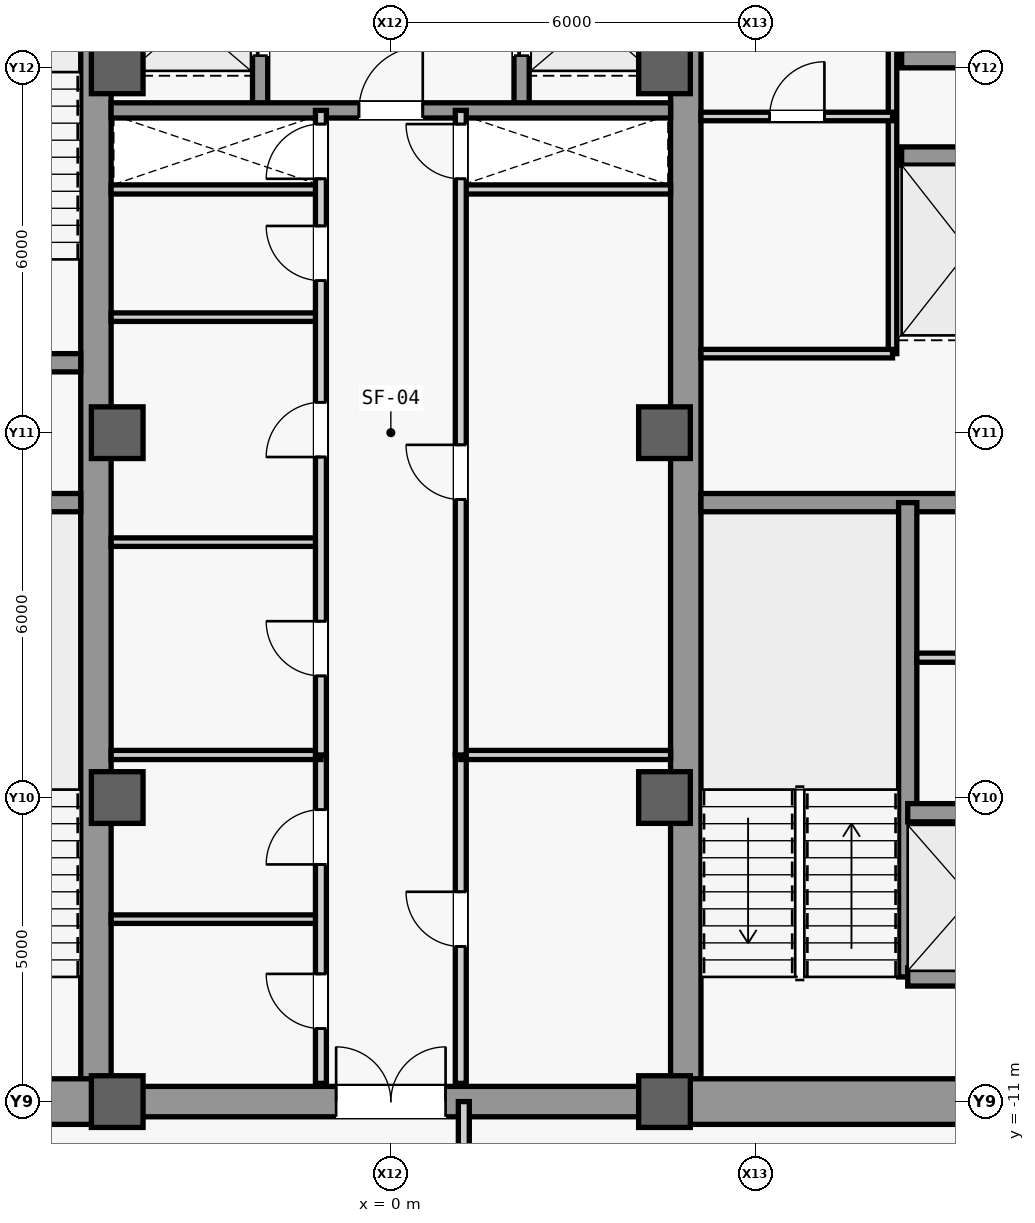
"""IFC4 building model, lengths in metres.
Left out: names, types, materials, properties, quantities, classifications, styles, units other than length and angle.
Written with IfcOpenShell. Run it as: python <this file> out.ifc"""

import sys

from ifc_helpers import new_model, si_unit, direction, frame, frame_2d, origin, origin_2d, place, context, subcontext, project, spatial, rectangle, extrude, source, transform, mapped, element, fill, save


model = new_model("IFC4")
c1 = context("Model", 3, precision=1e-05, world=origin(), true_north=direction((0.0, 1.0)))
c2 = subcontext(c1, "Body", "Model", "MODEL_VIEW")
j1 = project(units=[si_unit("LENGTHUNIT", "METRE"), si_unit("PLANEANGLEUNIT", "RADIAN")], contexts=[c1])
p1 = place(None, origin())
s1 = spatial("IfcSite", under=j1, at=p1, CompositionType="ELEMENT")
p2 = place(p1, origin())
s2 = spatial("IfcBuilding", under=s1, at=p2, CompositionType="ELEMENT")
p3 = place(p2, frame((0.0, 0.0, 171.1)))
s3 = spatial("IfcBuildingStorey", under=s2, at=p3, CompositionType="ELEMENT", Elevation=171.1)
m1 = source(origin(), c2, "Body", "SweptSolid", [
    extrude(rectangle(XDim=21.4, YDim=0.5, at=frame_2d((10.7, 0.0))), origin(), (0.0, 0.0, 1.0), 3.78),
])
for number, where, z_axis, x_axis in (
    (1, (-4.85, -10.7, 0.0), (0.0, 0.0, 1.0), (0.0, 1.0, 0.0)),
    (2, (4.85, -10.7, 0.0), (0.0, 0.0, 1.0), (0.0, 1.0, 0.0)),
):
    element("IfcWall", number, at=place(p3, frame(where, z_axis=z_axis, x_axis=x_axis)), inside=s3, PredefinedType="SHEAR", context=c2, shape_type="MappedRepresentation", body=[
        mapped(m1, transform((0.0, 0.0, 0.0), scale=1.0)),
    ])
m2 = source(origin(), c2, "Body", "SweptSolid", [
    extrude(rectangle(XDim=5.85, YDim=0.75, at=frame_2d((2.925, 0.0))), origin(), (0.0, 0.0, 1.0), 3.78),
])
for number, where, z_axis, x_axis in (
    (3, (-10.7, -11.0, 0.0), (0.0, 0.0, 1.0), (1.0, 0.0, 0.0)),
    (4, (4.85, -11.0, 0.0), (0.0, 0.0, 1.0), (1.0, 0.0, 0.0)),
):
    element("IfcWall", number, at=place(p3, frame(where, z_axis=z_axis, x_axis=x_axis)), inside=s3, PredefinedType="SHEAR", context=c2, shape_type="MappedRepresentation", body=[
        mapped(m2, transform((0.0, 0.0, 0.0), scale=1.0)),
    ])
m3 = source(origin(), c2, "Body", "SweptSolid", [
    extrude(rectangle(XDim=5.6, YDim=0.3, at=frame_2d((2.8, 0.0))), origin(), (0.0, 0.0, 1.0), 3.78),
])
for number, where, z_axis, x_axis in (
    (5, (-10.7, -1.15, 0.0), (0.0, 0.0, 1.0), (1.0, 0.0, 0.0)),
    (6, (-10.7, 1.15, 0.0), (0.0, 0.0, 1.0), (1.0, 0.0, 0.0)),
    (7, (5.1, -1.15, 0.0), (0.0, 0.0, 1.0), (1.0, 0.0, 0.0)),
):
    element("IfcWall", number, at=place(p3, frame(where, z_axis=z_axis, x_axis=x_axis)), inside=s3, PredefinedType="SHEAR", context=c2, shape_type="MappedRepresentation", body=[
        mapped(m3, transform((0.0, 0.0, 0.0), scale=1.0)),
    ])
m4 = source(origin(), c2, "Body", "SweptSolid", [
    extrude(rectangle(XDim=9.2, YDim=0.5, at=frame_2d((4.6, 0.0))), origin(), (0.0, 0.0, 1.0), 3.78),
])
p4 = place(p3, frame((-4.6, -11.0, 0.0), z_axis=(0.0, 0.0, 1.0), x_axis=(1.0, 0.0, 0.0)))
e8 = element("IfcWall", 8, at=p4, inside=s3, PredefinedType="SHEAR", context=c2, shape_type="MappedRepresentation", body=[
    mapped(m4, transform((0.0, 0.0, 0.0), scale=1.0)),
])
m5 = source(origin(), c2, "Body", "SweptSolid", [
    extrude(rectangle(XDim=1.8, YDim=2.25, at=frame_2d((0.9, 1.125))), frame((0.0, 0.26, 0.0), z_axis=(0.0, -1.0, 0.0), x_axis=(1.0, 0.0, 0.0)), (0.0, 0.0, 1.0), 0.52),
])
p5 = place(p4, frame((3.7, 0.0, 0.0)))
e9 = element("IfcOpeningElement", 9, at=p5, cuts=e8, PredefinedType="OPENING", context=c2, shape_type="MappedRepresentation", body=[
    mapped(m5, transform((0.0, 0.0, 0.0), scale=1.0)),
])
m6 = source(origin(), c2, "Body", "SweptSolid", [
    extrude(rectangle(XDim=0.85, YDim=0.85, at=origin_2d()), origin(), (0.0, 0.0, 1.0), 4.0),
])
for number, where, z_axis, x_axis in (
    (10, (-4.5, -11.0, 0.0), (0.0, 0.0, 1.0), (1.0, 0.0, 0.0)),
    (11, (-4.5, -6.0, 0.0), (0.0, 0.0, 1.0), (1.0, 0.0, 0.0)),
    (12, (-4.5, 0.0, 0.0), (0.0, 0.0, 1.0), (1.0, 0.0, 0.0)),
    (13, (-4.5, 6.0, 0.0), (0.0, 0.0, 1.0), (1.0, 0.0, 0.0)),
    (14, (4.5, -11.0, 0.0), (0.0, 0.0, 1.0), (1.0, 0.0, 0.0)),
    (15, (4.5, -6.0, 0.0), (0.0, 0.0, 1.0), (1.0, 0.0, 0.0)),
    (16, (4.5, 0.0, 0.0), (0.0, 0.0, 1.0), (1.0, 0.0, 0.0)),
    (17, (4.5, 6.0, 0.0), (0.0, 0.0, 1.0), (1.0, 0.0, 0.0)),
):
    element("IfcColumn", number, at=place(p3, frame(where, z_axis=z_axis, x_axis=x_axis)), inside=s3, PredefinedType="COLUMN", context=c2, shape_type="MappedRepresentation", body=[
        mapped(m6, transform((0.0, 0.0, 0.0), scale=1.0)),
    ])
m7 = source(origin(), c2, "Body", "SweptSolid", [
    extrude(rectangle(XDim=7.8, YDim=0.3, at=frame_2d((3.9, 0.0))), origin(), (0.0, 0.0, 1.0), 3.78),
])
p6 = place(p3, frame((8.5, -8.95, 0.0), z_axis=(0.0, 0.0, 1.0), x_axis=(0.0, 1.0, 0.0)))
e18 = element("IfcWall", 18, at=p6, inside=s3, PredefinedType="SHEAR", context=c2, shape_type="MappedRepresentation", body=[
    mapped(m7, transform((0.0, 0.0, 0.0), scale=1.0)),
])
m8 = source(origin(), c2, "Body", "SweptSolid", [
    extrude(rectangle(XDim=2.2, YDim=0.3, at=frame_2d((1.1, 0.0))), origin(), (0.0, 0.0, 1.0), 3.78),
])
for number, where, z_axis, x_axis in (
    (19, (8.5, -8.95, 0.0), (0.0, 0.0, 1.0), (1.0, 0.0, 0.0)),
    (20, (8.5, -6.25, 0.0), (0.0, 0.0, 1.0), (1.0, 0.0, 0.0)),
):
    element("IfcWall", number, at=place(p3, frame(where, z_axis=z_axis, x_axis=x_axis)), inside=s3, PredefinedType="SHEAR", context=c2, shape_type="MappedRepresentation", body=[
        mapped(m8, transform((0.0, 0.0, 0.0), scale=1.0)),
    ])
m9 = source(origin(), c2, "Body", "SweptSolid", [
    extrude(rectangle(XDim=2.3, YDim=0.3, at=frame_2d((1.15, 0.0))), origin(), (0.0, 0.0, 1.0), 3.78),
])
for number, where, z_axis, x_axis in (
    (21, (8.4, 4.55, 0.0), (0.0, 0.0, 1.0), (1.0, 0.0, 0.0)),
    (22, (8.4, 6.15, 0.0), (0.0, 0.0, 1.0), (1.0, 0.0, 0.0)),
):
    element("IfcWall", number, at=place(p3, frame(where, z_axis=z_axis, x_axis=x_axis)), inside=s3, PredefinedType="SHEAR", context=c2, shape_type="MappedRepresentation", body=[
        mapped(m9, transform((0.0, 0.0, 0.0), scale=1.0)),
    ])
m10 = source(origin(), c2, "Body", "SweptSolid", [
    extrude(rectangle(XDim=2.05, YDim=0.15, at=frame_2d((1.025, 0.0))), origin(), (0.0, 0.0, 1.0), 3.78),
])
p7 = place(p3, frame((8.65, -3.7, 0.0), z_axis=(0.0, 0.0, 1.0), x_axis=(1.0, 0.0, 0.0)))
e23 = element("IfcWall", 23, at=p7, inside=s3, PredefinedType="PARTITIONING", context=c2, shape_type="MappedRepresentation", body=[
    mapped(m10, transform((0.0, 0.0, 0.0), scale=1.0)),
])
m11 = source(origin(), c2, "Body", "SweptSolid", [
    extrude(rectangle(XDim=9.4, YDim=0.14, at=frame_2d((4.7, 0.0))), origin(), (0.0, 0.0, 1.0), 3.78),
])
p8 = place(p3, frame((8.25, 1.3, 0.0), z_axis=(0.0, 0.0, 1.0), x_axis=(0.0, 1.0, 0.0)))
e24 = element("IfcWall", 24, at=p8, inside=s3, PredefinedType="PARTITIONING", context=c2, shape_type="MappedRepresentation", body=[
    mapped(m11, transform((0.0, 0.0, 0.0), scale=1.0)),
])
m12 = source(origin(), c2, "Body", "SweptSolid", [
    extrude(rectangle(XDim=3.15, YDim=0.14, at=frame_2d((1.575, 0.0))), origin(), (0.0, 0.0, 1.0), 3.78),
])
p9 = place(p3, frame((5.1, 1.3, 0.0), z_axis=(0.0, 0.0, 1.0), x_axis=(1.0, 0.0, 0.0)))
e25 = element("IfcWall", 25, at=p9, inside=s3, PredefinedType="PARTITIONING", context=c2, shape_type="MappedRepresentation", body=[
    mapped(m12, transform((0.0, 0.0, 0.0), scale=1.0)),
])
p10 = place(p3, frame((5.1, 5.2, 0.0), z_axis=(0.0, 0.0, 1.0), x_axis=(1.0, 0.0, 0.0)))
e26 = element("IfcWall", 26, at=p10, inside=s3, PredefinedType="PARTITIONING", context=c2, shape_type="MappedRepresentation", body=[
    mapped(m12, transform((0.0, 0.0, 0.0), scale=1.0)),
])
m13 = source(origin(), c2, "Body", "SweptSolid", [
    extrude(rectangle(XDim=0.9, YDim=2.15, at=frame_2d((0.45, 1.075))), frame((0.0, 0.08, 0.0), z_axis=(0.0, -1.0, 0.0), x_axis=(1.0, 0.0, 0.0)), (0.0, 0.0, 1.0), 0.16),
])
p11 = place(p10, frame((1.13, 0.0, 0.0)))
e27 = element("IfcOpeningElement", 27, at=p11, cuts=e26, PredefinedType="OPENING", context=c2, shape_type="MappedRepresentation", body=[
    mapped(m13, transform((0.0, 0.0, 0.0), scale=1.0)),
])
m14 = source(origin(), c2, "Body", "SweptSolid", [
    extrude(rectangle(XDim=3.45, YDim=0.15, at=frame_2d((1.725, 0.0))), origin(), (0.0, 0.0, 1.0), 3.78),
])
for number, where, z_axis, x_axis in (
    (28, (-4.6, 4.0, 0.0), (0.0, 0.0, 1.0), (1.0, 0.0, 0.0)),
    (29, (1.15, 4.0, 0.0), (0.0, 0.0, 1.0), (1.0, 0.0, 0.0)),
):
    element("IfcWall", number, at=place(p3, frame(where, z_axis=z_axis, x_axis=x_axis)), inside=s3, PredefinedType="PARTITIONING", context=c2, shape_type="MappedRepresentation", body=[
        mapped(m14, transform((0.0, 0.0, 0.0), scale=1.0)),
    ])
m15 = source(origin(), c2, "Body", "SweptSolid", [
    extrude(rectangle(XDim=3.45, YDim=0.14, at=frame_2d((1.725, 0.0))), origin(), (0.0, 0.0, 1.0), 3.78),
])
p12 = place(p3, frame((-4.6, -8.0, 0.0), z_axis=(0.0, 0.0, 1.0), x_axis=(1.0, 0.0, 0.0)))
e30 = element("IfcWall", 30, at=p12, inside=s3, PredefinedType="PARTITIONING", context=c2, shape_type="MappedRepresentation", body=[
    mapped(m15, transform((0.0, 0.0, 0.0), scale=1.0)),
])
m16 = source(origin(), c2, "Body", "SweptSolid", [
    extrude(rectangle(XDim=5.4, YDim=0.18, at=frame_2d((2.7, 0.0))), origin(), (0.0, 0.0, 1.0), 3.78),
])
p13 = place(p3, frame((-1.15, -10.7, 0.0), z_axis=(0.0, 0.0, 1.0), x_axis=(0.0, 1.0, 0.0)))
e31 = element("IfcWall", 31, at=p13, inside=s3, PredefinedType="PARTITIONING", context=c2, shape_type="MappedRepresentation", body=[
    mapped(m16, transform((0.0, 0.0, 0.0), scale=1.0)),
])
m17 = source(origin(), c2, "Body", "SweptSolid", [
    extrude(rectangle(XDim=0.9, YDim=2.15, at=frame_2d((0.45, 1.075))), frame((0.0, 0.1, 0.0), z_axis=(0.0, -1.0, 0.0), x_axis=(1.0, 0.0, 0.0)), (0.0, 0.0, 1.0), 0.2),
])
p14 = place(p13, frame((0.9, 0.0, 0.0)))
e32 = element("IfcOpeningElement", 32, at=p14, cuts=e31, PredefinedType="OPENING", context=c2, shape_type="MappedRepresentation", body=[
    mapped(m17, transform((0.0, 0.0, 0.0), scale=1.0)),
])
p15 = place(p13, frame((3.6, 0.0, 0.0)))
e33 = element("IfcOpeningElement", 33, at=p15, cuts=e31, PredefinedType="OPENING", context=c2, shape_type="MappedRepresentation", body=[
    mapped(m17, transform((0.0, 0.0, 0.0), scale=1.0)),
])
p16 = place(p3, frame((1.15, -10.7, 0.0), z_axis=(0.0, 0.0, 1.0), x_axis=(0.0, 1.0, 0.0)))
e34 = element("IfcWall", 34, at=p16, inside=s3, PredefinedType="PARTITIONING", context=c2, shape_type="MappedRepresentation", body=[
    mapped(m16, transform((0.0, 0.0, 0.0), scale=1.0)),
])
p17 = place(p16, frame((2.25, 0.0, 0.0)))
e35 = element("IfcOpeningElement", 35, at=p17, cuts=e34, PredefinedType="OPENING", context=c2, shape_type="MappedRepresentation", body=[
    mapped(m17, transform((0.0, 0.0, 0.0), scale=1.0)),
])
for number, where, z_axis, x_axis in (
    (36, (-4.6, -5.3, 0.0), (0.0, 0.0, 1.0), (1.0, 0.0, 0.0)),
    (37, (1.15, -5.3, 0.0), (0.0, 0.0, 1.0), (1.0, 0.0, 0.0)),
):
    element("IfcWall", number, at=place(p3, frame(where, z_axis=z_axis, x_axis=x_axis)), inside=s3, PredefinedType="PARTITIONING", context=c2, shape_type="MappedRepresentation", body=[
        mapped(m14, transform((0.0, 0.0, 0.0), scale=1.0)),
    ])
m18 = source(origin(), c2, "Body", "SweptSolid", [
    extrude(rectangle(XDim=5.4, YDim=0.25, at=frame_2d((2.7, 0.0))), origin(), (0.0, 0.0, 1.0), 3.78),
])
p18 = place(p3, frame((-2.15, 5.3, 0.0), z_axis=(0.0, 0.0, 1.0), x_axis=(0.0, 1.0, 0.0)))
e38 = element("IfcWall", 38, at=p18, inside=s3, PredefinedType="SHEAR", context=c2, shape_type="MappedRepresentation", body=[
    mapped(m18, transform((0.0, 0.0, 0.0), scale=1.0)),
])
m19 = source(origin(), c2, "Body", "SweptSolid", [
    extrude(rectangle(XDim=1.2, YDim=2.3, at=frame_2d((0.6, 1.15))), frame((0.0, 0.135, 0.0), z_axis=(0.0, -1.0, 0.0), x_axis=(1.0, 0.0, 0.0)), (0.0, 0.0, 1.0), 0.27),
])
p19 = place(p18, frame((3.3, 0.0, 0.0)))
e39 = element("IfcOpeningElement", 39, at=p19, cuts=e38, PredefinedType="OPENING", context=c2, shape_type="MappedRepresentation", body=[
    mapped(m19, transform((0.0, 0.0, 0.0), scale=1.0)),
])
p20 = place(p18, frame((0.9, 0.0, 0.0)))
e40 = element("IfcOpeningElement", 40, at=p20, cuts=e38, PredefinedType="OPENING", context=c2, shape_type="MappedRepresentation", body=[
    mapped(m19, transform((0.0, 0.0, 0.0), scale=1.0)),
])
p21 = place(p3, frame((2.15, 5.3, 0.0), z_axis=(0.0, 0.0, 1.0), x_axis=(0.0, 1.0, 0.0)))
e41 = element("IfcWall", 41, at=p21, inside=s3, PredefinedType="SHEAR", context=c2, shape_type="MappedRepresentation", body=[
    mapped(m18, transform((0.0, 0.0, 0.0), scale=1.0)),
])
p22 = place(p21, frame((3.3, 0.0, 0.0)))
e42 = element("IfcOpeningElement", 42, at=p22, cuts=e41, PredefinedType="OPENING", context=c2, shape_type="MappedRepresentation", body=[
    mapped(m19, transform((0.0, 0.0, 0.0), scale=1.0)),
])
p23 = place(p21, frame((0.9, 0.0, 0.0)))
e43 = element("IfcOpeningElement", 43, at=p23, cuts=e41, PredefinedType="OPENING", context=c2, shape_type="MappedRepresentation", body=[
    mapped(m19, transform((0.0, 0.0, 0.0), scale=1.0)),
])
m20 = source(origin(), c2, "Body", "SweptSolid", [
    extrude(rectangle(XDim=9.2, YDim=0.25, at=frame_2d((4.6, 0.0))), origin(), (0.0, 0.0, 1.0), 3.78),
])
p24 = place(p3, frame((-4.6, 5.3, 0.0), z_axis=(0.0, 0.0, 1.0), x_axis=(1.0, 0.0, 0.0)))
e44 = element("IfcWall", 44, at=p24, inside=s3, PredefinedType="SHEAR", context=c2, shape_type="MappedRepresentation", body=[
    mapped(m20, transform((0.0, 0.0, 0.0), scale=1.0)),
])
m21 = source(origin(), c2, "Body", "SweptSolid", [
    extrude(rectangle(XDim=1.05, YDim=2.2, at=frame_2d((0.525, 1.1))), frame((0.0, 0.135, 0.0), z_axis=(0.0, -1.0, 0.0), x_axis=(1.0, 0.0, 0.0)), (0.0, 0.0, 1.0), 0.27),
])
p25 = place(p24, frame((4.075, 0.0, 0.0)))
e45 = element("IfcOpeningElement", 45, at=p25, cuts=e44, PredefinedType="OPENING", context=c2, shape_type="MappedRepresentation", body=[
    mapped(m21, transform((0.0, 0.0, 0.0), scale=1.0)),
])
for number, where, z_axis, x_axis in (
    (46, (-4.6, -1.8, 0.0), (0.0, 0.0, 1.0), (1.0, 0.0, 0.0)),
    (47, (-4.6, 1.9, 0.0), (0.0, 0.0, 1.0), (1.0, 0.0, 0.0)),
):
    element("IfcWall", number, at=place(p3, frame(where, z_axis=z_axis, x_axis=x_axis)), inside=s3, PredefinedType="PARTITIONING", context=c2, shape_type="MappedRepresentation", body=[
        mapped(m15, transform((0.0, 0.0, 0.0), scale=1.0)),
    ])
m22 = source(origin(), c2, "Body", "SweptSolid", [
    extrude(rectangle(XDim=10.6, YDim=0.18, at=frame_2d((5.3, 0.0))), origin(), (0.0, 0.0, 1.0), 3.78),
])
p26 = place(p3, frame((-1.15, -5.3, 0.0), z_axis=(0.0, 0.0, 1.0), x_axis=(0.0, 1.0, 0.0)))
e48 = element("IfcWall", 48, at=p26, inside=s3, PredefinedType="PARTITIONING", context=c2, shape_type="MappedRepresentation", body=[
    mapped(m22, transform((0.0, 0.0, 0.0), scale=1.0)),
])
p27 = place(p26, frame((1.3, 0.0, 0.0)))
e49 = element("IfcOpeningElement", 49, at=p27, cuts=e48, PredefinedType="OPENING", context=c2, shape_type="MappedRepresentation", body=[
    mapped(m17, transform((0.0, 0.0, 0.0), scale=1.0)),
])
p28 = place(p26, frame((4.9, 0.0, 0.0)))
e50 = element("IfcOpeningElement", 50, at=p28, cuts=e48, PredefinedType="OPENING", context=c2, shape_type="MappedRepresentation", body=[
    mapped(m17, transform((0.0, 0.0, 0.0), scale=1.0)),
])
p29 = place(p26, frame((7.8, 0.0, 0.0)))
e51 = element("IfcOpeningElement", 51, at=p29, cuts=e48, PredefinedType="OPENING", context=c2, shape_type="MappedRepresentation", body=[
    mapped(m17, transform((0.0, 0.0, 0.0), scale=1.0)),
])
p30 = place(p26, frame((9.475, 0.0, 0.0)))
e52 = element("IfcOpeningElement", 52, at=p30, cuts=e48, PredefinedType="OPENING", context=c2, shape_type="MappedRepresentation", body=[
    mapped(m17, transform((0.0, 0.0, 0.0), scale=1.0)),
])
p31 = place(p3, frame((1.15, -5.3, 0.0), z_axis=(0.0, 0.0, 1.0), x_axis=(0.0, 1.0, 0.0)))
e53 = element("IfcWall", 53, at=p31, inside=s3, PredefinedType="PARTITIONING", context=c2, shape_type="MappedRepresentation", body=[
    mapped(m22, transform((0.0, 0.0, 0.0), scale=1.0)),
])
p32 = place(p31, frame((4.2, 0.0, 0.0)))
e54 = element("IfcOpeningElement", 54, at=p32, cuts=e53, PredefinedType="OPENING", context=c2, shape_type="MappedRepresentation", body=[
    mapped(m17, transform((0.0, 0.0, 0.0), scale=1.0)),
])
p33 = place(p31, frame((9.475, 0.0, 0.0)))
e55 = element("IfcOpeningElement", 55, at=p33, cuts=e53, PredefinedType="OPENING", context=c2, shape_type="MappedRepresentation", body=[
    mapped(m17, transform((0.0, 0.0, 0.0), scale=1.0)),
])
m23 = source(origin(), c2, "Body", "SweptSolid", [
    extrude(rectangle(XDim=3.2, YDim=0.18, at=frame_2d((1.6, 0.0))), origin(), (0.0, 0.0, 1.0), 3.78),
])
p34 = place(p3, frame((1.2, -14.2, 0.0), z_axis=(0.0, 0.0, 1.0), x_axis=(0.0, 1.0, 0.0)))
e56 = element("IfcWall", 56, at=p34, inside=s3, PredefinedType="PARTITIONING", context=c2, shape_type="MappedRepresentation", body=[
    mapped(m23, transform((0.0, 0.0, 0.0), scale=1.0)),
])
m24 = source(origin(), c2, "Body", "SweptSolid", [
    extrude(rectangle(XDim=0.9, YDim=2.15, at=frame_2d((0.45, 1.075))), frame((0.0, 0.025, 0.0), z_axis=(0.0, -1.0, 0.0), x_axis=(1.0, 0.0, 0.0)), (0.0, 0.0, 1.0), 0.05),
])
p35 = place(p11, origin())
e57 = element("IfcDoor", 57, at=p35, inside=s3, OperationType="SINGLE_SWING_RIGHT", PredefinedType="DOOR", context=c2, shape_type="MappedRepresentation", body=[
    mapped(m24, transform((0.0, 0.0, 0.0), scale=1.0)),
])
fill(e27, e57)
p36 = place(p14, origin())
e58 = element("IfcDoor", 58, at=p36, inside=s3, OperationType="SINGLE_SWING_RIGHT", PredefinedType="DOOR", context=c2, shape_type="MappedRepresentation", body=[
    mapped(m24, transform((0.0, 0.0, 0.0), scale=1.0)),
])
fill(e32, e58)
p37 = place(p15, origin())
e59 = element("IfcDoor", 59, at=p37, inside=s3, OperationType="SINGLE_SWING_LEFT", PredefinedType="DOOR", context=c2, shape_type="MappedRepresentation", body=[
    mapped(m24, transform((0.0, 0.0, 0.0), scale=1.0)),
])
fill(e33, e59)
p38 = place(p17, origin())
e60 = element("IfcDoor", 60, at=p38, inside=s3, OperationType="SINGLE_SWING_RIGHT", PredefinedType="DOOR", context=c2, shape_type="MappedRepresentation", body=[
    mapped(m24, transform((0.0, 0.0, 0.0), scale=1.0)),
])
fill(e35, e60)
m25 = source(origin(), c2, "Body", "SweptSolid", [
    extrude(rectangle(XDim=1.8, YDim=2.25, at=frame_2d((0.9, 1.125))), frame((0.0, 0.025, 0.0), z_axis=(0.0, -1.0, 0.0), x_axis=(1.0, 0.0, 0.0)), (0.0, 0.0, 1.0), 0.05),
])
p39 = place(p5, origin())
e61 = element("IfcDoor", 61, at=p39, inside=s3, OperationType="SINGLE_SWING_LEFT", PredefinedType="DOOR", context=c2, shape_type="MappedRepresentation", body=[
    mapped(m25, transform((0.0, 0.0, 0.0), scale=1.0)),
])
fill(e9, e61)
m26 = source(origin(), c2, "Body", "SweptSolid", [
    extrude(rectangle(XDim=1.05, YDim=2.2, at=frame_2d((0.525, 1.1))), frame((0.0, 0.025, 0.0), z_axis=(0.0, -1.0, 0.0), x_axis=(1.0, 0.0, 0.0)), (0.0, 0.0, 1.0), 0.05),
])
p40 = place(p25, origin())
e62 = element("IfcDoor", 62, at=p40, inside=s3, OperationType="SINGLE_SWING_RIGHT", PredefinedType="DOOR", context=c2, shape_type="MappedRepresentation", body=[
    mapped(m26, transform((0.0, 0.0, 0.0), scale=1.0)),
])
fill(e45, e62)
p41 = place(p27, origin())
e63 = element("IfcDoor", 63, at=p41, inside=s3, OperationType="SINGLE_SWING_RIGHT", PredefinedType="DOOR", context=c2, shape_type="MappedRepresentation", body=[
    mapped(m24, transform((0.0, 0.0, 0.0), scale=1.0)),
])
fill(e49, e63)
p42 = place(p28, origin())
e64 = element("IfcDoor", 64, at=p42, inside=s3, OperationType="SINGLE_SWING_LEFT", PredefinedType="DOOR", context=c2, shape_type="MappedRepresentation", body=[
    mapped(m24, transform((0.0, 0.0, 0.0), scale=1.0)),
])
fill(e50, e64)
p43 = place(p29, origin())
e65 = element("IfcDoor", 65, at=p43, inside=s3, OperationType="SINGLE_SWING_RIGHT", PredefinedType="DOOR", context=c2, shape_type="MappedRepresentation", body=[
    mapped(m24, transform((0.0, 0.0, 0.0), scale=1.0)),
])
fill(e51, e65)
p44 = place(p32, origin())
e66 = element("IfcDoor", 66, at=p44, inside=s3, OperationType="SINGLE_SWING_RIGHT", PredefinedType="DOOR", context=c2, shape_type="MappedRepresentation", body=[
    mapped(m24, transform((0.0, 0.0, 0.0), scale=1.0)),
])
fill(e54, e66)
p45 = place(p30, origin())
e67 = element("IfcDoor", 67, at=p45, inside=s3, OperationType="SINGLE_SWING_LEFT", PredefinedType="DOOR", context=c2, shape_type="MappedRepresentation", body=[
    mapped(m24, transform((0.0, 0.0, 0.0), scale=1.0)),
])
fill(e52, e67)
p46 = place(p33, origin())
e68 = element("IfcDoor", 68, at=p46, inside=s3, OperationType="SINGLE_SWING_RIGHT", PredefinedType="DOOR", context=c2, shape_type="MappedRepresentation", body=[
    mapped(m24, transform((0.0, 0.0, 0.0), scale=1.0)),
])
fill(e55, e68)
m27 = source(origin(), c2, "Body", "SweptSolid", [
    extrude(rectangle(XDim=1.2, YDim=2.3, at=frame_2d((0.6, 1.15))), frame((0.0, 0.025, 0.0), z_axis=(0.0, -1.0, 0.0), x_axis=(1.0, 0.0, 0.0)), (0.0, 0.0, 1.0), 0.05),
])
p47 = place(p20, origin())
e69 = element("IfcDoor", 69, at=p47, inside=s3, OperationType="SLIDING_TO_LEFT", PredefinedType="DOOR", context=c2, shape_type="MappedRepresentation", body=[
    mapped(m27, transform((0.0, 0.0, 0.0), scale=1.0)),
])
fill(e40, e69)
p48 = place(p23, origin())
e70 = element("IfcDoor", 70, at=p48, inside=s3, OperationType="SLIDING_TO_LEFT", PredefinedType="DOOR", context=c2, shape_type="MappedRepresentation", body=[
    mapped(m27, transform((0.0, 0.0, 0.0), scale=1.0)),
])
fill(e43, e70)
save(model, sys.argv[1])
